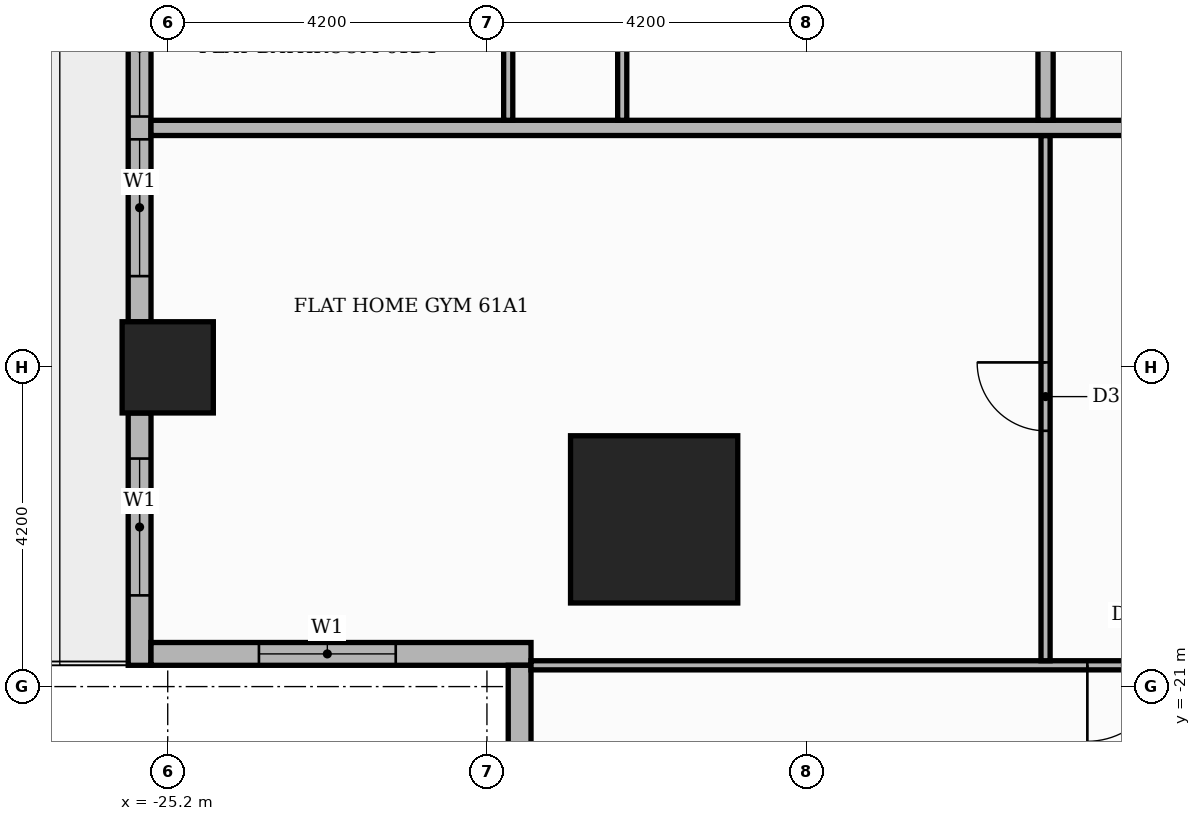
"""IFC4 building model, lengths in metres.
Left out: names, types, materials, properties, quantities, classifications, styles, units other than length and angle.
Written with IfcOpenShell. Run it as: python <this file> out.ifc"""

import sys

from ifc_helpers import new_model, si_unit, direction, frame, frame_2d, origin, origin_2d, place, context, subcontext, project, spatial, rectangle, extrude, element, fill, save


model = new_model("IFC4")
c1 = context("Model", 3, precision=1e-05, world=origin(), true_north=direction((0.0, 1.0)))
c2 = subcontext(c1, "Body", "Model", "MODEL_VIEW")
j1 = project(units=[si_unit("LENGTHUNIT", "METRE"), si_unit("PLANEANGLEUNIT", "RADIAN")], contexts=[c1])
p1 = place(None, origin())
s1 = spatial("IfcSite", under=j1, at=p1, CompositionType="ELEMENT")
p2 = place(p1, origin())
s2 = spatial("IfcBuilding", under=s1, at=p2, CompositionType="ELEMENT")
p3 = place(p2, frame((0.0, 0.0, 256.2)))
s3 = spatial("IfcBuildingStorey", under=s2, at=p3, CompositionType="ELEMENT", Elevation=256.2)
p4 = place(p3, frame((-18.8, -18.8, 0.0), z_axis=(0.0, 0.0, 1.0), x_axis=(1.0, 0.0, 0.0)))
e1 = element("IfcColumn", 1, at=p4, inside=s3, PredefinedType="COLUMN", context=c2, shape_type="SweptSolid", body=[
    extrude(rectangle(XDim=2.2, YDim=2.2, at=origin_2d()), origin(), (0.0, 0.0, 1.0), 3.9),
])
p5 = place(p3, frame((-25.2, -16.8, 0.0), z_axis=(0.0, 0.0, 1.0), x_axis=(1.0, 0.0, 0.0)))
e2 = element("IfcColumn", 2, at=p5, inside=s3, PredefinedType="COLUMN", context=c2, shape_type="SweptSolid", body=[
    extrude(rectangle(XDim=1.2, YDim=1.2, at=origin_2d()), origin(), (0.0, 0.0, 1.0), 3.9),
])
p6 = place(p3, frame((-25.57, -9.0, 0.0), z_axis=(0.0, 0.0, 1.0), x_axis=(0.0, -1.0, 0.0)))
e3 = element("IfcWall", 3, at=p6, inside=s3, PredefinedType="STANDARD", context=c2, shape_type="SweptSolid", body=[
    extrude(rectangle(XDim=7.2, YDim=0.3, at=frame_2d((3.6, 0.0))), origin(), (0.0, 0.0, 1.0), 3.48),
])
p7 = place(p6, frame((0.6, 0.0, 0.9)))
e4 = element("IfcOpeningElement", 4, at=p7, cuts=e3, PredefinedType="OPENING", context=c2, shape_type="SweptSolid", body=[
    extrude(rectangle(XDim=1.8, YDim=2.1, at=frame_2d((0.9, 1.05))), frame((0.0, 0.16, 0.0), z_axis=(0.0, -1.0, 0.0), x_axis=(1.0, 0.0, 0.0)), (0.0, 0.0, 1.0), 0.32),
])
p8 = place(p6, frame((2.7, 0.0, 0.9)))
e5 = element("IfcOpeningElement", 5, at=p8, cuts=e3, PredefinedType="OPENING", context=c2, shape_type="SweptSolid", body=[
    extrude(rectangle(XDim=1.8, YDim=2.1, at=frame_2d((0.9, 1.05))), frame((0.0, 0.16, 0.0), z_axis=(0.0, -1.0, 0.0), x_axis=(1.0, 0.0, 0.0)), (0.0, 0.0, 1.0), 0.32),
])
p9 = place(p6, frame((4.8, 0.0, 0.9)))
e6 = element("IfcOpeningElement", 6, at=p9, cuts=e3, PredefinedType="OPENING", context=c2, shape_type="SweptSolid", body=[
    extrude(rectangle(XDim=1.8, YDim=2.1, at=frame_2d((0.9, 1.05))), frame((0.0, 0.16, 0.0), z_axis=(0.0, -1.0, 0.0), x_axis=(1.0, 0.0, 0.0)), (0.0, 0.0, 1.0), 0.32),
])
p10 = place(p3, frame((-25.57, -17.4, 0.0), z_axis=(0.0, 0.0, 1.0), x_axis=(0.0, -1.0, 0.0)))
e7 = element("IfcWall", 7, at=p10, inside=s3, PredefinedType="STANDARD", context=c2, shape_type="SweptSolid", body=[
    extrude(rectangle(XDim=3.32, YDim=0.3, at=frame_2d((1.66, 0.0))), origin(), (0.0, 0.0, 1.0), 3.48),
])
p11 = place(p10, frame((0.6, 0.0, 0.9)))
e8 = element("IfcOpeningElement", 8, at=p11, cuts=e7, PredefinedType="OPENING", context=c2, shape_type="SweptSolid", body=[
    extrude(rectangle(XDim=1.8, YDim=2.1, at=frame_2d((0.9, 1.05))), frame((0.0, 0.16, 0.0), z_axis=(0.0, -1.0, 0.0), x_axis=(1.0, 0.0, 0.0)), (0.0, 0.0, 1.0), 0.32),
])
p12 = place(p3, frame((-25.42, -20.57, 0.0), z_axis=(0.0, 0.0, 1.0), x_axis=(1.0, 0.0, 0.0)))
e9 = element("IfcWall", 9, at=p12, inside=s3, PredefinedType="STANDARD", context=c2, shape_type="SweptSolid", body=[
    extrude(rectangle(XDim=5.0, YDim=0.3, at=frame_2d((2.5, 0.0))), origin(), (0.0, 0.0, 1.0), 3.48),
])
p13 = place(p12, frame((1.42, 0.0, 0.9)))
e10 = element("IfcOpeningElement", 10, at=p13, cuts=e9, PredefinedType="OPENING", context=c2, shape_type="SweptSolid", body=[
    extrude(rectangle(XDim=1.8, YDim=2.1, at=frame_2d((0.9, 1.05))), frame((0.0, 0.16, 0.0), z_axis=(0.0, -1.0, 0.0), x_axis=(1.0, 0.0, 0.0)), (0.0, 0.0, 1.0), 0.32),
])
p14 = place(p3, frame((-20.57, -20.72, 0.0), z_axis=(0.0, 0.0, 1.0), x_axis=(0.0, -1.0, 0.0)))
e11 = element("IfcWall", 11, at=p14, inside=s3, PredefinedType="STANDARD", context=c2, shape_type="SweptSolid", body=[
    extrude(rectangle(XDim=5.0, YDim=0.3, at=frame_2d((2.5, 0.0))), origin(), (0.0, 0.0, 1.0), 3.48),
])
p15 = place(p14, frame((1.48, 0.0, 0.9)))
e12 = element("IfcOpeningElement", 12, at=p15, cuts=e11, PredefinedType="OPENING", context=c2, shape_type="SweptSolid", body=[
    extrude(rectangle(XDim=1.8, YDim=2.1, at=frame_2d((0.9, 1.05))), frame((0.0, 0.16, 0.0), z_axis=(0.0, -1.0, 0.0), x_axis=(1.0, 0.0, 0.0)), (0.0, 0.0, 1.0), 0.32),
])
p16 = place(p3, frame((-20.42, -20.72, 0.0), z_axis=(0.0, 0.0, 1.0), x_axis=(1.0, 0.0, 0.0)))
e13 = element("IfcWall", 13, at=p16, inside=s3, PredefinedType="PARTITIONING", context=c2, shape_type="SweptSolid", body=[
    extrude(rectangle(XDim=12.77, YDim=0.12, at=frame_2d((6.385, 0.0))), origin(), (0.0, 0.0, 1.0), 3.48),
])
p17 = place(p16, frame((7.32, 0.0, 0.0)))
e14 = element("IfcOpeningElement", 14, at=p17, cuts=e13, PredefinedType="OPENING", context=c2, shape_type="SweptSolid", body=[
    extrude(rectangle(XDim=1.0, YDim=2.1, at=frame_2d((0.5, 1.05))), frame((0.0, 0.07, 0.0), z_axis=(0.0, -1.0, 0.0), x_axis=(1.0, 0.0, 0.0)), (0.0, 0.0, 1.0), 0.14),
])
p18 = place(p16, frame((10.47, 0.0, 0.0)))
e15 = element("IfcOpeningElement", 15, at=p18, cuts=e13, PredefinedType="OPENING", context=c2, shape_type="SweptSolid", body=[
    extrude(rectangle(XDim=1.0, YDim=2.1, at=frame_2d((0.5, 1.05))), frame((0.0, 0.07, 0.0), z_axis=(0.0, -1.0, 0.0), x_axis=(1.0, 0.0, 0.0)), (0.0, 0.0, 1.0), 0.14),
])
p19 = place(p3, frame((-13.65, -20.66, 0.0), z_axis=(0.0, 0.0, 1.0), x_axis=(0.0, 1.0, 0.0)))
e16 = element("IfcWall", 16, at=p19, inside=s3, PredefinedType="PARTITIONING", context=c2, shape_type="SweptSolid", body=[
    extrude(rectangle(XDim=6.91, YDim=0.12, at=frame_2d((3.455, 0.0))), origin(), (0.0, 0.0, 1.0), 3.48),
])
p20 = place(p19, frame((3.025, 0.0, 0.0)))
e17 = element("IfcOpeningElement", 17, at=p20, cuts=e16, PredefinedType="OPENING", context=c2, shape_type="SweptSolid", body=[
    extrude(rectangle(XDim=0.9, YDim=2.1, at=frame_2d((0.45, 1.05))), frame((0.0, 0.07, 0.0), z_axis=(0.0, -1.0, 0.0), x_axis=(1.0, 0.0, 0.0)), (0.0, 0.0, 1.0), 0.14),
])
p21 = place(p3, frame((-25.42, -13.65, 0.0), z_axis=(0.0, 0.0, 1.0), x_axis=(1.0, 0.0, 0.0)))
e18 = element("IfcWall", 18, at=p21, inside=s3, PredefinedType="PARTITIONING", context=c2, shape_type="SweptSolid", body=[
    extrude(rectangle(XDim=39.07, YDim=0.2, at=frame_2d((19.535, 0.0))), origin(), (0.0, 0.0, 1.0), 3.48),
])
p22 = place(p21, frame((14.37, 0.0, 0.0)))
e19 = element("IfcOpeningElement", 19, at=p22, cuts=e18, PredefinedType="OPENING", context=c2, shape_type="SweptSolid", body=[
    extrude(rectangle(XDim=1.1, YDim=2.4, at=frame_2d((0.55, 1.2))), frame((0.0, 0.11, 0.0), z_axis=(0.0, -1.0, 0.0), x_axis=(1.0, 0.0, 0.0)), (0.0, 0.0, 1.0), 0.22),
])
p23 = place(p3, frame((-20.72, -13.55, 0.0), z_axis=(0.0, 0.0, 1.0), x_axis=(0.0, 1.0, 0.0)))
e20 = element("IfcWall", 20, at=p23, inside=s3, PredefinedType="PARTITIONING", context=c2, shape_type="SweptSolid", body=[
    extrude(rectangle(XDim=1.94, YDim=0.12, at=frame_2d((0.97, 0.0))), origin(), (0.0, 0.0, 1.0), 3.48),
])
p24 = place(p3, frame((-19.22, -13.55, 0.0), z_axis=(0.0, 0.0, 1.0), x_axis=(0.0, 1.0, 0.0)))
e21 = element("IfcWall", 21, at=p24, inside=s3, PredefinedType="PARTITIONING", context=c2, shape_type="SweptSolid", body=[
    extrude(rectangle(XDim=4.04, YDim=0.12, at=frame_2d((2.02, 0.0))), origin(), (0.0, 0.0, 1.0), 3.48),
])
p25 = place(p24, frame((1.55, 0.0, 0.0)))
e22 = element("IfcOpeningElement", 22, at=p25, cuts=e21, PredefinedType="OPENING", context=c2, shape_type="SweptSolid", body=[
    extrude(rectangle(XDim=0.9, YDim=2.1, at=frame_2d((0.45, 1.05))), frame((0.0, 0.07, 0.0), z_axis=(0.0, -1.0, 0.0), x_axis=(1.0, 0.0, 0.0)), (0.0, 0.0, 1.0), 0.14),
])
p26 = place(p3, frame((-13.65, -13.55, 0.0), z_axis=(0.0, 0.0, 1.0), x_axis=(0.0, 1.0, 0.0)))
e23 = element("IfcWall", 23, at=p26, inside=s3, PredefinedType="PARTITIONING", context=c2, shape_type="SweptSolid", body=[
    extrude(rectangle(XDim=2.45, YDim=0.2, at=frame_2d((1.225, 0.0))), origin(), (0.0, 0.0, 1.0), 3.48),
])
p27 = place(p8, origin())
e24 = element("IfcWindow", 24, at=p27, inside=s3, PartitioningType="SINGLE_PANEL", PredefinedType="WINDOW", context=c2, shape_type="SweptSolid", body=[
    extrude(rectangle(XDim=1.8, YDim=2.1, at=frame_2d((0.9, 1.05))), frame((0.0, 0.03, 0.0), z_axis=(0.0, -1.0, 0.0), x_axis=(1.0, 0.0, 0.0)), (0.0, 0.0, 1.0), 0.06),
])
fill(e5, e24)
p28 = place(p9, origin())
e25 = element("IfcWindow", 25, at=p28, inside=s3, PartitioningType="SINGLE_PANEL", PredefinedType="WINDOW", context=c2, shape_type="SweptSolid", body=[
    extrude(rectangle(XDim=1.8, YDim=2.1, at=frame_2d((0.9, 1.05))), frame((0.0, 0.03, 0.0), z_axis=(0.0, -1.0, 0.0), x_axis=(1.0, 0.0, 0.0)), (0.0, 0.0, 1.0), 0.06),
])
fill(e6, e25)
p29 = place(p11, origin())
e26 = element("IfcWindow", 26, at=p29, inside=s3, PartitioningType="SINGLE_PANEL", PredefinedType="WINDOW", context=c2, shape_type="SweptSolid", body=[
    extrude(rectangle(XDim=1.8, YDim=2.1, at=frame_2d((0.9, 1.05))), frame((0.0, 0.03, 0.0), z_axis=(0.0, -1.0, 0.0), x_axis=(1.0, 0.0, 0.0)), (0.0, 0.0, 1.0), 0.06),
])
fill(e8, e26)
p30 = place(p13, origin())
e27 = element("IfcWindow", 27, at=p30, inside=s3, PartitioningType="SINGLE_PANEL", PredefinedType="WINDOW", context=c2, shape_type="SweptSolid", body=[
    extrude(rectangle(XDim=1.8, YDim=2.1, at=frame_2d((0.9, 1.05))), frame((0.0, 0.03, 0.0), z_axis=(0.0, -1.0, 0.0), x_axis=(1.0, 0.0, 0.0)), (0.0, 0.0, 1.0), 0.06),
])
fill(e10, e27)
p31 = place(p20, origin())
e28 = element("IfcDoor", 28, at=p31, inside=s3, OperationType="SINGLE_SWING_RIGHT", PredefinedType="DOOR", context=c2, shape_type="SweptSolid", body=[
    extrude(rectangle(XDim=0.9, YDim=2.1, at=frame_2d((0.45, 1.05))), frame((0.0, 0.025, 0.0), z_axis=(0.0, -1.0, 0.0), x_axis=(1.0, 0.0, 0.0)), (0.0, 0.0, 1.0), 0.05),
])
fill(e17, e28)
p32 = place(p17, frame((1.0, 0.0, 0.0), z_axis=(0.0, 0.0, 1.0), x_axis=(-1.0, 0.0, 0.0)))
e29 = element("IfcDoor", 29, at=p32, inside=s3, OperationType="SINGLE_SWING_LEFT", PredefinedType="DOOR", context=c2, shape_type="SweptSolid", body=[
    extrude(rectangle(XDim=1.0, YDim=2.1, at=frame_2d((0.5, 1.05))), frame((0.0, 0.025, 0.0), z_axis=(0.0, -1.0, 0.0), x_axis=(1.0, 0.0, 0.0)), (0.0, 0.0, 1.0), 0.05),
])
fill(e14, e29)
save(model, sys.argv[1])
